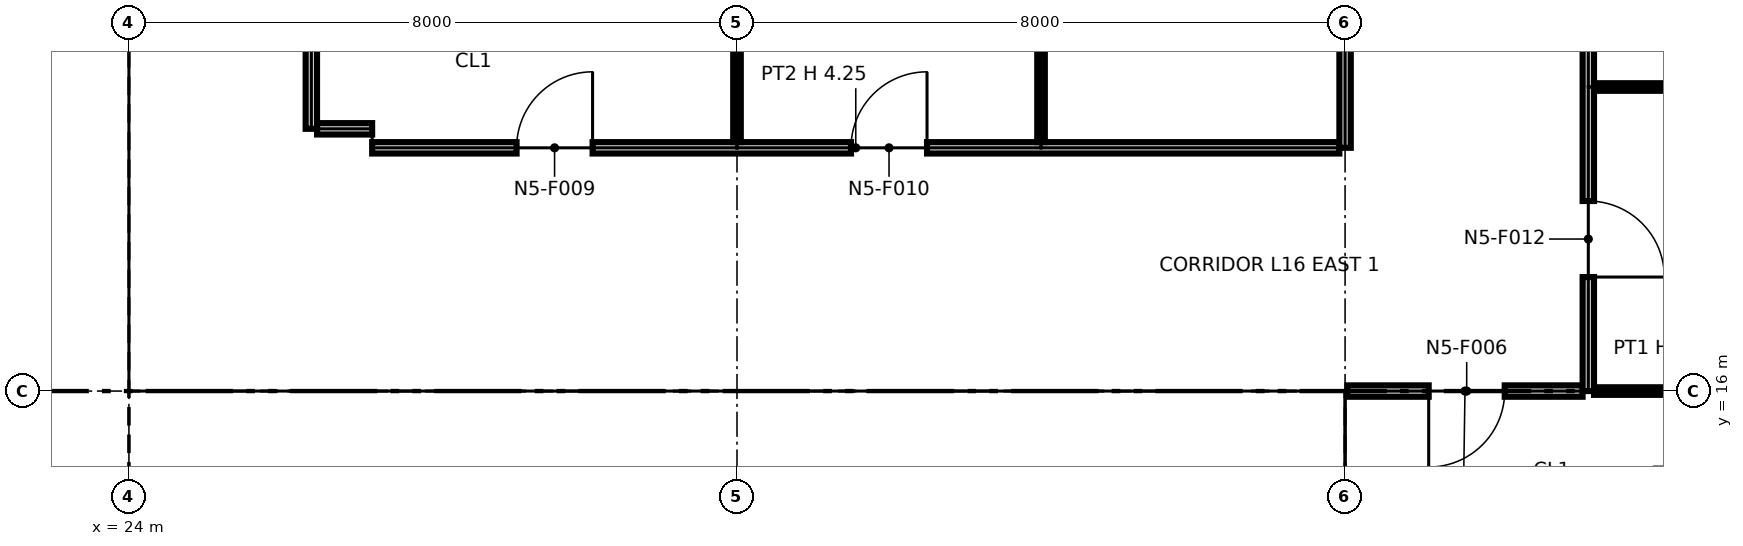
"""IFC4 building model, lengths in metres.
Left out: names, types, materials, properties, quantities, classifications, styles, units other than length and angle.
Written with IfcOpenShell. Run it as: python <this file> out.ifc"""

import sys

from ifc_helpers import new_model, si_unit, direction, frame, frame_2d, origin, origin_2d, place, context, subcontext, project, spatial, polyline, rectangle, i_section, outline, extrude, element, fill, save


model = new_model("IFC4")
c1 = context("Model", 3, precision=1e-05, world=origin(), true_north=direction((0.0, 1.0)))
c2 = subcontext(c1, "Body", "Model", "MODEL_VIEW")
j1 = project(units=[si_unit("LENGTHUNIT", "METRE"), si_unit("PLANEANGLEUNIT", "RADIAN")], contexts=[c1])
p1 = place(None, origin())
s1 = spatial("IfcSite", under=j1, at=p1, CompositionType="ELEMENT")
p2 = place(p1, origin())
s2 = spatial("IfcBuilding", under=s1, at=p2, CompositionType="ELEMENT")
p3 = place(p2, frame((0.0, 0.0, 87.6)))
s3 = spatial("IfcBuildingStorey", under=s2, at=p3, CompositionType="ELEMENT", Elevation=87.6)
p4 = place(p3, frame((24.0, 16.0, 0.0), z_axis=(0.0, 0.0, 1.0), x_axis=(1.0, 0.0, 0.0)))
e1 = element("IfcColumn", 1, at=p4, inside=s3, PredefinedType="COLUMN", context=c2, shape_type="SweptSolid", body=[
    extrude(i_section(OverallWidth=0.411, OverallDepth=0.434, WebThickness=0.036, FlangeThickness=0.057, at=origin_2d()), origin(), (0.0, 0.0, 1.0), 4.25),
])
for number, where, z_axis, x_axis in (
    (2, (32.0, 16.0, 0.0), (0.0, 0.0, 1.0), (1.0, 0.0, 0.0)),
    (3, (40.0, 16.0, 0.0), (0.0, 0.0, 1.0), (1.0, 0.0, 0.0)),
):
    element("IfcColumn", number, at=place(p3, frame(where, z_axis=z_axis, x_axis=x_axis)), inside=s3, PredefinedType="COLUMN", context=c2, shape_type="SweptSolid", body=[
        extrude(i_section(OverallWidth=0.406, OverallDepth=0.417, WebThickness=0.03, FlangeThickness=0.048, at=origin_2d()), origin(), (0.0, 0.0, 1.0), 4.25),
    ])
p5 = place(p3, frame((8.85, 19.9, 0.0), z_axis=(0.0, 0.0, 1.0), x_axis=(1.0, 0.0, 0.0)))
e4 = element("IfcWall", 4, at=p5, inside=s3, PredefinedType="PARTITIONING", context=c2, shape_type="SweptSolid", body=[
    extrude(outline(polyline([(0.0, 0.0), (14.3, 0.0), (14.3, 3.789), (7.27, 3.789), (7.269, 3.632), (7.031, 3.632), (7.031, 4.25), (0.0, 4.25), (0.0, 0.0)])), frame((0.0, 0.1, 0.0), z_axis=(0.0, -1.0, 0.0), x_axis=(1.0, 0.0, 0.0)), (0.0, 0.0, 1.0), 0.2),
])
p6 = place(p5, frame((6.3, 0.0, 0.0)))
e5 = element("IfcOpeningElement", 5, at=p6, cuts=e4, PredefinedType="OPENING", context=c2, shape_type="SweptSolid", body=[
    extrude(rectangle(XDim=0.9, YDim=2.1, at=frame_2d((0.45, 1.05))), frame((0.0, 0.11, 0.0), z_axis=(0.0, -1.0, 0.0), x_axis=(1.0, 0.0, 0.0)), (0.0, 0.0, 1.0), 0.22),
])
p7 = place(p5, frame((8.55, 0.0, 0.0)))
e6 = element("IfcOpeningElement", 6, at=p7, cuts=e4, PredefinedType="OPENING", context=c2, shape_type="SweptSolid", body=[
    extrude(rectangle(XDim=0.9, YDim=2.1, at=frame_2d((0.45, 1.05))), frame((0.0, 0.11, 0.0), z_axis=(0.0, -1.0, 0.0), x_axis=(1.0, 0.0, 0.0)), (0.0, 0.0, 1.0), 0.22),
])
p8 = place(p5, frame((10.5, 0.0, 0.0)))
e7 = element("IfcOpeningElement", 7, at=p8, cuts=e4, PredefinedType="OPENING", context=c2, shape_type="SweptSolid", body=[
    extrude(rectangle(XDim=0.9, YDim=2.1, at=frame_2d((0.45, 1.05))), frame((0.0, 0.11, 0.0), z_axis=(0.0, -1.0, 0.0), x_axis=(1.0, 0.0, 0.0)), (0.0, 0.0, 1.0), 0.22),
])
p9 = place(p5, frame((12.575, 0.0, 0.0)))
e8 = element("IfcOpeningElement", 8, at=p9, cuts=e4, PredefinedType="OPENING", context=c2, shape_type="SweptSolid", body=[
    extrude(rectangle(XDim=1.0, YDim=2.1, at=frame_2d((0.5, 1.05))), frame((0.0, 0.11, 0.0), z_axis=(0.0, -1.0, 0.0), x_axis=(1.0, 0.0, 0.0)), (0.0, 0.0, 1.0), 0.22),
])
p10 = place(p3, frame((16.219, 16.0, 0.0), z_axis=(0.0, 0.0, 1.0), x_axis=(1.0, 0.0, 0.0)))
e9 = element("IfcWall", 9, at=p10, inside=s3, PredefinedType="PARTITIONING", context=c2, shape_type="SweptSolid", body=[
    extrude(rectangle(XDim=6.931, YDim=0.6, at=frame_2d((3.466, 0.0))), origin(), (0.0, 0.0, 1.0), 3.632),
])
p11 = place(p10, frame((6.631, 0.0, 0.0), z_axis=(0.0, 0.0, 1.0), x_axis=(-1.0, 0.0, 0.0)))
e10 = element("IfcOpeningElement", 10, at=p11, cuts=e9, PredefinedType="OPENING", context=c2, shape_type="SweptSolid", body=[
    extrude(rectangle(XDim=0.7, YDim=2.1, at=frame_2d((0.35, 1.05))), frame((0.0, 0.31, 0.0), z_axis=(0.0, -1.0, 0.0), x_axis=(1.0, 0.0, 0.0)), (0.0, 0.0, 1.0), 0.62),
])
p12 = place(p3, frame((23.25, 8.85, 0.0), z_axis=(0.0, 0.0, 1.0), x_axis=(0.0, 1.0, 0.0)))
e11 = element("IfcWall", 11, at=p12, inside=s3, PredefinedType="PARTITIONING", context=c2, shape_type="SweptSolid", body=[
    extrude(outline(polyline([(0.0, 0.0), (14.3, 0.0), (14.3, 4.25), (11.231, 4.25), (11.23, 3.789), (11.07, 3.789), (11.069, 4.25), (7.27, 4.25), (7.269, 3.632), (7.031, 3.632), (7.031, 4.25), (1.231, 4.25), (1.23, 3.789), (1.07, 3.789), (1.069, 4.25), (0.0, 4.25), (0.0, 0.0)])), frame((0.0, 0.1, 0.0), z_axis=(0.0, -1.0, 0.0), x_axis=(1.0, 0.0, 0.0)), (0.0, 0.0, 1.0), 0.2),
])
p13 = place(p12, frame((8.3, 0.0, 0.0)))
e12 = element("IfcOpeningElement", 12, at=p13, cuts=e11, PredefinedType="OPENING", context=c2, shape_type="SweptSolid", body=[
    extrude(rectangle(XDim=1.8, YDim=2.1, at=frame_2d((0.9, 1.05))), frame((0.0, 0.11, 0.0), z_axis=(0.0, -1.0, 0.0), x_axis=(1.0, 0.0, 0.0)), (0.0, 0.0, 1.0), 0.22),
])
p14 = place(p3, frame((24.75, 8.85, 0.0), z_axis=(0.0, 0.0, 1.0), x_axis=(0.0, 1.0, 0.0)))
e13 = element("IfcWall", 13, at=p14, inside=s3, PredefinedType="PARTITIONING", context=c2, shape_type="SweptSolid", body=[
    extrude(outline(polyline([(0.0, 0.0), (6.3, 0.0), (6.3, 4.25), (3.231, 4.25), (3.23, 3.789), (3.07, 3.789), (3.069, 4.25), (0.0, 4.25), (0.0, 0.0)])), frame((0.0, 0.1, 0.0), z_axis=(0.0, -1.0, 0.0), x_axis=(1.0, 0.0, 0.0)), (0.0, 0.0, 1.0), 0.2),
])
p15 = place(p3, frame((24.65, 15.25, 0.0), z_axis=(0.0, 0.0, 1.0), x_axis=(1.0, 0.0, 0.0)))
e14 = element("IfcWall", 14, at=p15, inside=s3, PredefinedType="PARTITIONING", context=c2, shape_type="SweptSolid", body=[
    extrude(outline(polyline([(0.0, 0.0), (14.7, 0.0), (14.7, 4.25), (7.469, 4.25), (7.469, 3.632), (7.231, 3.632), (7.23, 4.25), (0.0, 4.25), (0.0, 0.0)])), frame((0.0, 0.1, 0.0), z_axis=(0.0, -1.0, 0.0), x_axis=(1.0, 0.0, 0.0)), (0.0, 0.0, 1.0), 0.2),
])
p16 = place(p15, frame((2.85, 0.0, 0.0)))
e15 = element("IfcOpeningElement", 15, at=p16, cuts=e14, PredefinedType="OPENING", context=c2, shape_type="SweptSolid", body=[
    extrude(rectangle(XDim=1.8, YDim=2.1, at=frame_2d((0.9, 1.05))), frame((0.0, 0.11, 0.0), z_axis=(0.0, -1.0, 0.0), x_axis=(1.0, 0.0, 0.0)), (0.0, 0.0, 1.0), 0.22),
])
p17 = place(p15, frame((9.95, 0.0, 0.0), z_axis=(0.0, 0.0, 1.0), x_axis=(-1.0, 0.0, 0.0)))
e16 = element("IfcOpeningElement", 16, at=p17, cuts=e14, PredefinedType="OPENING", context=c2, shape_type="SweptSolid", body=[
    extrude(rectangle(XDim=1.4, YDim=2.1, at=frame_2d((0.7, 1.05))), frame((0.0, 0.11, 0.0), z_axis=(0.0, -1.0, 0.0), x_axis=(1.0, 0.0, 0.0)), (0.0, 0.0, 1.0), 0.22),
])
p18 = place(p15, frame((13.4, 0.0, 0.0), z_axis=(0.0, 0.0, 1.0), x_axis=(-1.0, 0.0, 0.0)))
e17 = element("IfcOpeningElement", 17, at=p18, cuts=e14, PredefinedType="OPENING", context=c2, shape_type="SweptSolid", body=[
    extrude(rectangle(XDim=1.4, YDim=2.1, at=frame_2d((0.7, 1.05))), frame((0.0, 0.11, 0.0), z_axis=(0.0, -1.0, 0.0), x_axis=(1.0, 0.0, 0.0)), (0.0, 0.0, 1.0), 0.22),
])
p19 = place(p3, frame((32.0, 13.2, 0.0), z_axis=(0.0, 0.0, 1.0), x_axis=(0.0, 1.0, 0.0)))
e18 = element("IfcWall", 18, at=p19, inside=s3, PredefinedType="PARTITIONING", context=c2, shape_type="SweptSolid", body=[
    extrude(rectangle(XDim=1.95, YDim=0.6, at=frame_2d((0.975, 0.0))), origin(), (0.0, 0.0, 1.0), 3.632),
])
for number, where, z_axis, x_axis in (
    (19, (35.6, 8.85, 0.0), (0.0, 0.0, 1.0), (0.0, 1.0, 0.0)),
    (20, (39.25, 8.85, 0.0), (0.0, 0.0, 1.0), (0.0, 1.0, 0.0)),
):
    element("IfcWall", number, at=place(p3, frame(where, z_axis=z_axis, x_axis=x_axis)), inside=s3, PredefinedType="PARTITIONING", context=c2, shape_type="SweptSolid", body=[
        extrude(rectangle(XDim=6.3, YDim=0.2, at=frame_2d((3.15, 0.0))), origin(), (0.0, 0.0, 1.0), 4.25),
    ])
p20 = place(p3, frame((40.03, 16.0, 0.0), z_axis=(0.0, 0.0, 1.0), x_axis=(1.0, 0.0, 0.0)))
e21 = element("IfcWall", 21, at=p20, inside=s3, PredefinedType="PARTITIONING", context=c2, shape_type="SweptSolid", body=[
    extrude(rectangle(XDim=3.095, YDim=0.15, at=frame_2d((1.547, 0.0))), origin(), (0.0, 0.0, 1.0), 3.47),
])
p21 = place(p20, frame((2.07, 0.0, 0.0), z_axis=(0.0, 0.0, 1.0), x_axis=(-1.0, 0.0, 0.0)))
e22 = element("IfcOpeningElement", 22, at=p21, cuts=e21, PredefinedType="OPENING", context=c2, shape_type="SweptSolid", body=[
    extrude(rectangle(XDim=1.0, YDim=2.1, at=frame_2d((0.5, 1.05))), frame((0.0, 0.085, 0.0), z_axis=(0.0, -1.0, 0.0), x_axis=(1.0, 0.0, 0.0)), (0.0, 0.0, 1.0), 0.17),
])
p22 = place(p3, frame((43.275, 16.0, 0.0), z_axis=(0.0, 0.0, 1.0), x_axis=(1.0, 0.0, 0.0)))
e23 = element("IfcWall", 23, at=p22, inside=s3, PredefinedType="PARTITIONING", context=c2, shape_type="SweptSolid", body=[
    extrude(rectangle(XDim=1.895, YDim=0.1, at=frame_2d((0.948, 0.0))), origin(), (0.0, 0.0, 1.0), 3.47),
])
p23 = place(p3, frame((43.2, 16.0, 0.0), z_axis=(0.0, 0.0, 1.0), x_axis=(0.0, 1.0, 0.0)))
e24 = element("IfcWall", 24, at=p23, inside=s3, PredefinedType="PARTITIONING", context=c2, shape_type="SweptSolid", body=[
    extrude(outline(polyline([(0.0, 0.0), (27.125, 0.0), (27.125, 4.25), (24.3, 4.25), (24.298, 3.47), (23.702, 3.47), (23.7, 4.25), (20.3, 4.25), (20.298, 3.47), (19.702, 3.47), (19.7, 4.25), (16.3, 4.25), (16.298, 3.47), (15.702, 3.47), (15.7, 4.25), (12.3, 4.25), (12.298, 3.47), (11.702, 3.47), (11.7, 4.25), (8.3, 4.25), (8.298, 3.47), (7.702, 3.47), (7.7, 4.25), (4.3, 4.25), (4.298, 3.47), (3.702, 3.47), (3.7, 4.25), (0.0, 4.25), (0.0, 0.0)])), frame((0.0, 0.075, 0.0), z_axis=(0.0, -1.0, 0.0), x_axis=(1.0, 0.0, 0.0)), (0.0, 0.0, 1.0), 0.15),
])
p24 = place(p23, frame((2.5, 0.0, 0.0), z_axis=(0.0, 0.0, 1.0), x_axis=(-1.0, 0.0, 0.0)))
e25 = element("IfcOpeningElement", 25, at=p24, cuts=e24, PredefinedType="OPENING", context=c2, shape_type="SweptSolid", body=[
    extrude(rectangle(XDim=1.0, YDim=2.1, at=frame_2d((0.5, 1.05))), frame((0.0, 0.085, 0.0), z_axis=(0.0, -1.0, 0.0), x_axis=(1.0, 0.0, 0.0)), (0.0, 0.0, 1.0), 0.17),
])
p25 = place(p23, frame((12.5, 0.0, 0.0), z_axis=(0.0, 0.0, 1.0), x_axis=(-1.0, 0.0, 0.0)))
e26 = element("IfcOpeningElement", 26, at=p25, cuts=e24, PredefinedType="OPENING", context=c2, shape_type="SweptSolid", body=[
    extrude(rectangle(XDim=1.0, YDim=2.1, at=frame_2d((0.5, 1.05))), frame((0.0, 0.085, 0.0), z_axis=(0.0, -1.0, 0.0), x_axis=(1.0, 0.0, 0.0)), (0.0, 0.0, 1.0), 0.17),
])
p26 = place(p23, frame((18.5, 0.0, 0.0), z_axis=(0.0, 0.0, 1.0), x_axis=(-1.0, 0.0, 0.0)))
e27 = element("IfcOpeningElement", 27, at=p26, cuts=e24, PredefinedType="OPENING", context=c2, shape_type="SweptSolid", body=[
    extrude(rectangle(XDim=1.0, YDim=2.1, at=frame_2d((0.5, 1.05))), frame((0.0, 0.085, 0.0), z_axis=(0.0, -1.0, 0.0), x_axis=(1.0, 0.0, 0.0)), (0.0, 0.0, 1.0), 0.17),
])
p27 = place(p23, frame((22.5, 0.0, 0.0), z_axis=(0.0, 0.0, 1.0), x_axis=(-1.0, 0.0, 0.0)))
e28 = element("IfcOpeningElement", 28, at=p27, cuts=e24, PredefinedType="OPENING", context=c2, shape_type="SweptSolid", body=[
    extrude(rectangle(XDim=1.0, YDim=2.1, at=frame_2d((0.5, 1.05))), frame((0.0, 0.085, 0.0), z_axis=(0.0, -1.0, 0.0), x_axis=(1.0, 0.0, 0.0)), (0.0, 0.0, 1.0), 0.17),
])
p28 = place(p23, frame((26.1, 0.0, 0.0), z_axis=(0.0, 0.0, 1.0), x_axis=(-1.0, 0.0, 0.0)))
e29 = element("IfcOpeningElement", 29, at=p28, cuts=e24, PredefinedType="OPENING", context=c2, shape_type="SweptSolid", body=[
    extrude(rectangle(XDim=1.0, YDim=2.1, at=frame_2d((0.5, 1.05))), frame((0.0, 0.085, 0.0), z_axis=(0.0, -1.0, 0.0), x_axis=(1.0, 0.0, 0.0)), (0.0, 0.0, 1.0), 0.17),
])
p29 = place(p3, frame((27.2, 19.2, 0.0), z_axis=(0.0, 0.0, 1.0), x_axis=(1.0, 0.0, 0.0)))
e30 = element("IfcWall", 30, at=p29, inside=s3, PredefinedType="PARTITIONING", context=c2, shape_type="SweptSolid", body=[
    extrude(rectangle(XDim=12.725, YDim=0.15, at=frame_2d((6.363, 0.0))), origin(), (0.0, 0.0, 1.0), 4.25),
])
p30 = place(p29, frame((1.9, 0.0, 0.0)))
e31 = element("IfcOpeningElement", 31, at=p30, cuts=e30, PredefinedType="OPENING", context=c2, shape_type="SweptSolid", body=[
    extrude(rectangle(XDim=1.0, YDim=2.1, at=frame_2d((0.5, 1.05))), frame((0.0, 0.085, 0.0), z_axis=(0.0, -1.0, 0.0), x_axis=(1.0, 0.0, 0.0)), (0.0, 0.0, 1.0), 0.17),
])
p31 = place(p29, frame((6.3, 0.0, 0.0)))
e32 = element("IfcOpeningElement", 32, at=p31, cuts=e30, PredefinedType="OPENING", context=c2, shape_type="SweptSolid", body=[
    extrude(rectangle(XDim=1.0, YDim=2.1, at=frame_2d((0.5, 1.05))), frame((0.0, 0.085, 0.0), z_axis=(0.0, -1.0, 0.0), x_axis=(1.0, 0.0, 0.0)), (0.0, 0.0, 1.0), 0.17),
])
p32 = place(p3, frame((32.0, 19.275, 0.0), z_axis=(0.0, 0.0, 1.0), x_axis=(0.0, 1.0, 0.0)))
e33 = element("IfcWall", 33, at=p32, inside=s3, PredefinedType="PARTITIONING", context=c2, shape_type="SweptSolid", body=[
    extrude(rectangle(XDim=4.675, YDim=0.1, at=frame_2d((2.337, 0.0))), origin(), (0.0, 0.0, 1.0), 3.47),
])
p33 = place(p3, frame((36.0, 19.275, 0.0), z_axis=(0.0, 0.0, 1.0), x_axis=(0.0, 1.0, 0.0)))
e34 = element("IfcWall", 34, at=p33, inside=s3, PredefinedType="PARTITIONING", context=c2, shape_type="SweptSolid", body=[
    extrude(outline(polyline([(0.0, 0.0), (4.675, 0.0), (4.675, 4.25), (1.025, 4.25), (1.023, 3.47), (0.427, 3.47), (0.425, 4.25), (0.0, 4.25), (0.0, 0.0)])), frame((0.0, 0.05, 0.0), z_axis=(0.0, -1.0, 0.0), x_axis=(1.0, 0.0, 0.0)), (0.0, 0.0, 1.0), 0.1),
])
p34 = place(p3, frame((40.0, 19.2, 0.0), z_axis=(0.0, 0.0, 1.0), x_axis=(0.0, 1.0, 0.0)))
e35 = element("IfcWall", 35, at=p34, inside=s3, PredefinedType="PARTITIONING", context=c2, shape_type="SweptSolid", body=[
    extrude(rectangle(XDim=12.77, YDim=0.15, at=frame_2d((6.385, 0.0))), origin(), (0.0, 0.0, 1.0), 3.47),
])
p35 = place(p34, frame((1.9, 0.0, 0.0)))
e36 = element("IfcOpeningElement", 36, at=p35, cuts=e35, PredefinedType="OPENING", context=c2, shape_type="SweptSolid", body=[
    extrude(rectangle(XDim=1.0, YDim=2.1, at=frame_2d((0.5, 1.05))), frame((0.0, 0.085, 0.0), z_axis=(0.0, -1.0, 0.0), x_axis=(1.0, 0.0, 0.0)), (0.0, 0.0, 1.0), 0.17),
])
p36 = place(p34, frame((6.3, 0.0, 0.0)))
e37 = element("IfcOpeningElement", 37, at=p36, cuts=e35, PredefinedType="OPENING", context=c2, shape_type="SweptSolid", body=[
    extrude(rectangle(XDim=1.0, YDim=2.1, at=frame_2d((0.5, 1.05))), frame((0.0, 0.085, 0.0), z_axis=(0.0, -1.0, 0.0), x_axis=(1.0, 0.0, 0.0)), (0.0, 0.0, 1.0), 0.17),
])
p37 = place(p34, frame((10.3, 0.0, 0.0)))
e38 = element("IfcOpeningElement", 38, at=p37, cuts=e35, PredefinedType="OPENING", context=c2, shape_type="SweptSolid", body=[
    extrude(rectangle(XDim=1.0, YDim=2.1, at=frame_2d((0.5, 1.05))), frame((0.0, 0.085, 0.0), z_axis=(0.0, -1.0, 0.0), x_axis=(1.0, 0.0, 0.0)), (0.0, 0.0, 1.0), 0.17),
])
p38 = place(p3, frame((26.475, 19.45, 0.0), z_axis=(0.0, 0.0, 1.0), x_axis=(1.0, 0.0, 0.0)))
e39 = element("IfcWall", 39, at=p38, inside=s3, PredefinedType="PARTITIONING", context=c2, shape_type="SweptSolid", body=[
    extrude(rectangle(XDim=0.725, YDim=0.15, at=frame_2d((0.362, 0.0))), origin(), (0.0, 0.0, 1.0), 4.25),
])
p39 = place(p3, frame((26.4, 19.45, 0.0), z_axis=(0.0, 0.0, 1.0), x_axis=(0.0, 1.0, 0.0)))
e40 = element("IfcWall", 40, at=p39, inside=s3, PredefinedType="PARTITIONING", context=c2, shape_type="SweptSolid", body=[
    extrude(outline(polyline([(0.0, 0.0), (12.52, 0.0), (12.52, 4.25), (8.85, 4.25), (8.848, 3.47), (8.252, 3.47), (8.25, 4.25), (4.85, 4.25), (4.848, 3.47), (4.252, 3.47), (4.25, 4.25), (0.85, 4.25), (0.848, 3.47), (0.252, 3.47), (0.25, 4.25), (0.0, 4.25), (0.0, 0.0)])), frame((0.0, 0.075, 0.0), z_axis=(0.0, -1.0, 0.0), x_axis=(1.0, 0.0, 0.0)), (0.0, 0.0, 1.0), 0.15),
])
p40 = place(p39, frame((9.05, 0.0, 0.0), z_axis=(0.0, 0.0, 1.0), x_axis=(-1.0, 0.0, 0.0)))
e41 = element("IfcOpeningElement", 41, at=p40, cuts=e40, PredefinedType="OPENING", context=c2, shape_type="SweptSolid", body=[
    extrude(rectangle(XDim=1.0, YDim=2.1, at=frame_2d((0.5, 1.05))), frame((0.0, 0.085, 0.0), z_axis=(0.0, -1.0, 0.0), x_axis=(1.0, 0.0, 0.0)), (0.0, 0.0, 1.0), 0.17),
])
p41 = place(p3, frame((43.275, 20.0, 0.0), z_axis=(0.0, 0.0, 1.0), x_axis=(1.0, 0.0, 0.0)))
e42 = element("IfcWall", 42, at=p41, inside=s3, PredefinedType="PARTITIONING", context=c2, shape_type="SweptSolid", body=[
    extrude(rectangle(XDim=4.595, YDim=0.1, at=frame_2d((2.298, 0.0))), origin(), (0.0, 0.0, 1.0), 3.47),
])
p42 = place(p13, origin())
e43 = element("IfcDoor", 43, at=p42, inside=s3, OperationType="DOUBLE_DOOR_SINGLE_SWING", PredefinedType="NOTDEFINED", context=c2, shape_type="SweptSolid", body=[
    extrude(rectangle(XDim=1.8, YDim=2.1, at=frame_2d((0.9, 1.05))), frame((0.0, 0.025, 0.0), z_axis=(0.0, -1.0, 0.0), x_axis=(1.0, 0.0, 0.0)), (0.0, 0.0, 1.0), 0.05),
])
fill(e12, e43)
p43 = place(p16, origin())
e44 = element("IfcDoor", 44, at=p43, inside=s3, OperationType="DOUBLE_DOOR_SINGLE_SWING", PredefinedType="NOTDEFINED", context=c2, shape_type="SweptSolid", body=[
    extrude(rectangle(XDim=1.8, YDim=2.1, at=frame_2d((0.9, 1.05))), frame((0.0, 0.025, 0.0), z_axis=(0.0, -1.0, 0.0), x_axis=(1.0, 0.0, 0.0)), (0.0, 0.0, 1.0), 0.05),
])
fill(e15, e44)
p44 = place(p17, origin())
e45 = element("IfcDoor", 45, at=p44, inside=s3, OperationType="DOUBLE_DOOR_SINGLE_SWING", PredefinedType="NOTDEFINED", context=c2, shape_type="SweptSolid", body=[
    extrude(rectangle(XDim=1.4, YDim=2.1, at=frame_2d((0.7, 1.05))), frame((0.0, 0.025, 0.0), z_axis=(0.0, -1.0, 0.0), x_axis=(1.0, 0.0, 0.0)), (0.0, 0.0, 1.0), 0.05),
])
fill(e16, e45)
p45 = place(p18, origin())
e46 = element("IfcDoor", 46, at=p45, inside=s3, OperationType="DOUBLE_DOOR_SINGLE_SWING", PredefinedType="NOTDEFINED", context=c2, shape_type="SweptSolid", body=[
    extrude(rectangle(XDim=1.4, YDim=2.1, at=frame_2d((0.7, 1.05))), frame((0.0, 0.025, 0.0), z_axis=(0.0, -1.0, 0.0), x_axis=(1.0, 0.0, 0.0)), (0.0, 0.0, 1.0), 0.05),
])
fill(e17, e46)
p46 = place(p21, origin())
e47 = element("IfcDoor", 47, at=p46, inside=s3, OperationType="SINGLE_SWING_RIGHT", PredefinedType="DOOR", context=c2, shape_type="SweptSolid", body=[
    extrude(rectangle(XDim=1.0, YDim=2.1, at=frame_2d((0.5, 1.05))), frame((0.0, 0.025, 0.0), z_axis=(0.0, -1.0, 0.0), x_axis=(1.0, 0.0, 0.0)), (0.0, 0.0, 1.0), 0.05),
])
fill(e22, e47)
p47 = place(p30, origin())
e48 = element("IfcDoor", 48, at=p47, inside=s3, OperationType="SINGLE_SWING_RIGHT", PredefinedType="DOOR", context=c2, shape_type="SweptSolid", body=[
    extrude(rectangle(XDim=1.0, YDim=2.1, at=frame_2d((0.5, 1.05))), frame((0.0, 0.025, 0.0), z_axis=(0.0, -1.0, 0.0), x_axis=(1.0, 0.0, 0.0)), (0.0, 0.0, 1.0), 0.05),
])
fill(e31, e48)
p48 = place(p31, origin())
e49 = element("IfcDoor", 49, at=p48, inside=s3, OperationType="SINGLE_SWING_RIGHT", PredefinedType="DOOR", context=c2, shape_type="SweptSolid", body=[
    extrude(rectangle(XDim=1.0, YDim=2.1, at=frame_2d((0.5, 1.05))), frame((0.0, 0.025, 0.0), z_axis=(0.0, -1.0, 0.0), x_axis=(1.0, 0.0, 0.0)), (0.0, 0.0, 1.0), 0.05),
])
fill(e32, e49)
p49 = place(p24, origin())
e50 = element("IfcDoor", 50, at=p49, inside=s3, OperationType="SINGLE_SWING_RIGHT", PredefinedType="DOOR", context=c2, shape_type="SweptSolid", body=[
    extrude(rectangle(XDim=1.0, YDim=2.1, at=frame_2d((0.5, 1.05))), frame((0.0, 0.025, 0.0), z_axis=(0.0, -1.0, 0.0), x_axis=(1.0, 0.0, 0.0)), (0.0, 0.0, 1.0), 0.05),
])
fill(e25, e50)
save(model, sys.argv[1])
